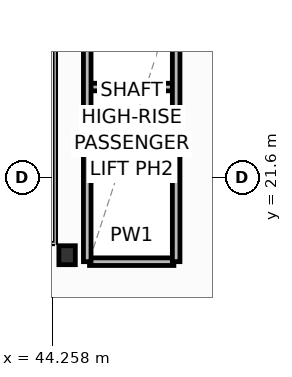
"""IFC4 building model, lengths in metres.
Left out: names, types, materials, properties, quantities, classifications, styles, units other than length and angle.
Written with IfcOpenShell. Run it as: python <this file> out.ifc"""

import sys

from ifc_helpers import new_model, si_unit, direction, frame, frame_2d, origin, origin_2d, place, context, subcontext, project, spatial, rectangle, i_section, extrude, element, save


model = new_model("IFC4")
c1 = context("Model", 3, precision=1e-05, world=origin(), true_north=direction((0.0, 1.0)))
c2 = subcontext(c1, "Body", "Model", "MODEL_VIEW")
j1 = project(units=[si_unit("LENGTHUNIT", "METRE"), si_unit("PLANEANGLEUNIT", "RADIAN")], contexts=[c1])
p1 = place(None, origin())
s1 = spatial("IfcSite", under=j1, at=p1, CompositionType="ELEMENT")
p2 = place(p1, origin())
s2 = spatial("IfcBuilding", under=s1, at=p2, CompositionType="ELEMENT")
p3 = place(p2, frame((0.0, 0.0, 45.5)))
s3 = spatial("IfcBuildingStorey", under=s2, at=p3, CompositionType="ELEMENT", Elevation=45.5)
p4 = place(p3, frame((44.65, 19.55, 0.0), z_axis=(0.0, 0.0, 1.0), x_axis=(1.0, 0.0, 0.0)))
e1 = element("IfcColumn", 1, at=p4, inside=s3, PredefinedType="COLUMN", context=c2, shape_type="SweptSolid", body=[
    extrude(i_section(OverallWidth=0.432, OverallDepth=0.498, WebThickness=0.056, FlangeThickness=0.089, FilletRadius=0.025, at=origin_2d()), origin(), (0.0, 0.0, 1.0), 3.7),
])
for number, where, z_axis, x_axis in (
    (2, (45.24, 21.675, 0.0), (0.0, 0.0, 1.0), (1.0, 0.0, 0.0)),
    (3, (45.24, 23.975, 0.0), (0.0, 0.0, 1.0), (1.0, 0.0, 0.0)),
):
    element("IfcWall", number, at=place(p3, frame(where, z_axis=z_axis, x_axis=x_axis)), inside=s3, PredefinedType="PARTITIONING", context=c2, shape_type="SweptSolid", body=[
        extrude(rectangle(XDim=2.22, YDim=0.2, at=frame_2d((1.11, 0.0))), origin(), (0.0, 0.0, 1.0), 3.45),
    ])
p5 = place(p3, frame((45.24, 19.38, 0.0), z_axis=(0.0, 0.0, 1.0), x_axis=(1.0, 0.0, 0.0)))
e4 = element("IfcWall", 4, at=p5, inside=s3, PredefinedType="PARTITIONING", context=c2, shape_type="SweptSolid", body=[
    extrude(rectangle(XDim=2.22, YDim=0.2, at=frame_2d((1.11, 0.0))), origin(), (0.0, 0.0, 1.0), 2.662),
])
for number, where, z_axis, x_axis in (
    (5, (45.18, 19.38, 0.0), (0.0, 0.0, 1.0), (0.0, 1.0, 0.0)),
    (6, (47.52, 19.38, 0.0), (0.0, 0.0, 1.0), (0.0, 1.0, 0.0)),
):
    element("IfcWall", number, at=place(p3, frame(where, z_axis=z_axis, x_axis=x_axis)), inside=s3, PredefinedType="PARTITIONING", context=c2, shape_type="SweptSolid", body=[
        extrude(rectangle(XDim=6.9, YDim=0.2, at=frame_2d((3.45, 0.0))), origin(), (0.0, 0.0, 1.0), 3.45),
    ])
save(model, sys.argv[1])
